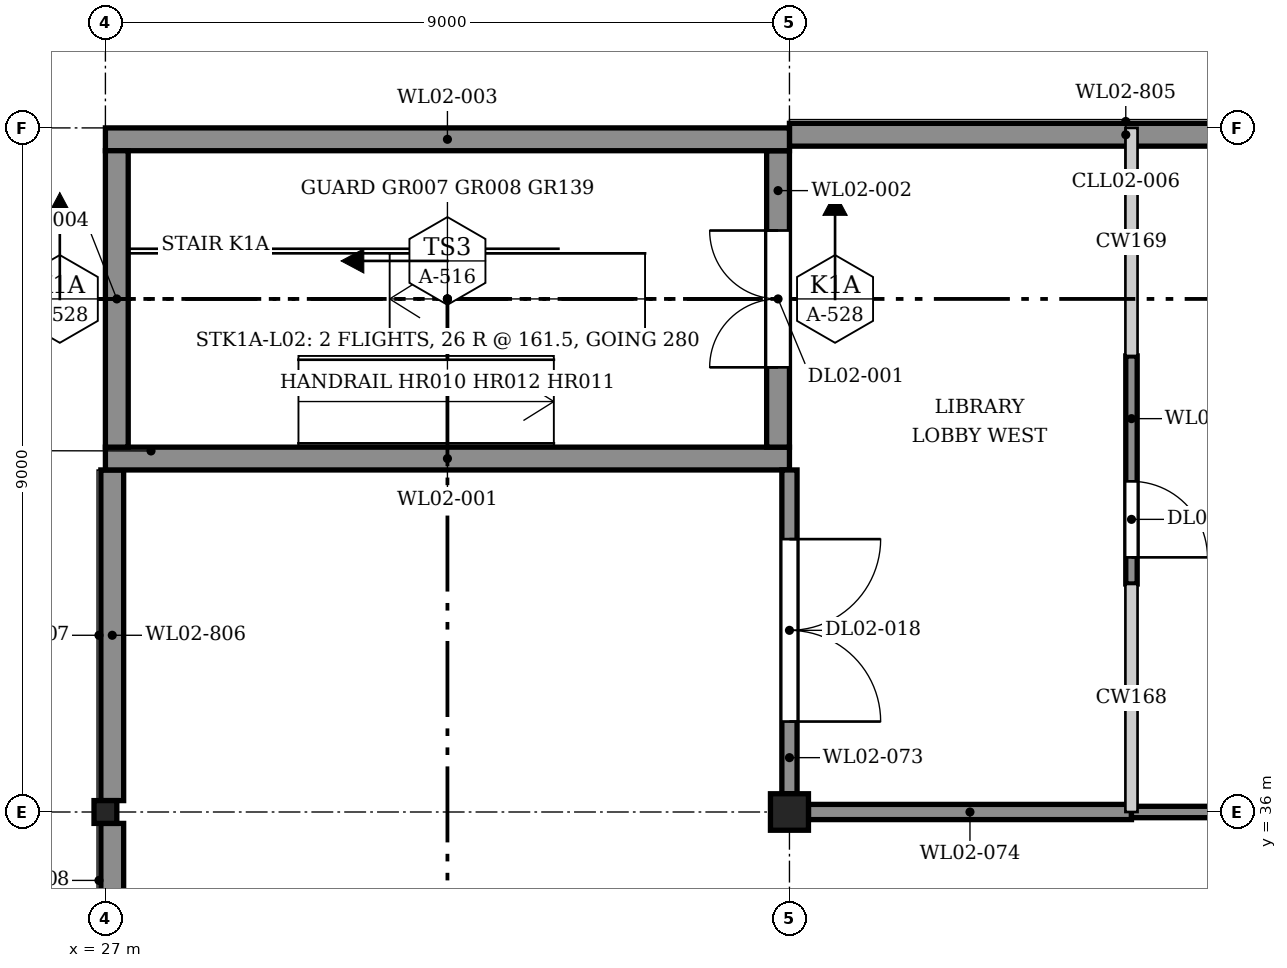
"""IFC4 building model, lengths in metres.
Left out: names, types, materials, properties, quantities, classifications, styles, units other than length and angle.
Written with IfcOpenShell. Run it as: python <this file> out.ifc"""

import sys

from ifc_helpers import new_model, si_unit, direction, frame, frame_2d, origin, origin_2d, place, context, subcontext, project, spatial, rectangle, hollow_rectangle, i_section, extrude, element, fill, save


model = new_model("IFC4")
c1 = context("Model", 3, precision=1e-05, world=origin(), true_north=direction((0.0, 1.0)))
c2 = subcontext(c1, "Body", "Model", "MODEL_VIEW")
j1 = project(units=[si_unit("LENGTHUNIT", "METRE"), si_unit("PLANEANGLEUNIT", "RADIAN")], contexts=[c1])
p1 = place(None, origin())
s1 = spatial("IfcSite", under=j1, at=p1, CompositionType="ELEMENT")
p2 = place(p1, origin())
s2 = spatial("IfcBuilding", under=s1, at=p2, CompositionType="ELEMENT")
p3 = place(p2, frame((0.0, 0.0, 9.2)))
s3 = spatial("IfcBuildingStorey", under=s2, at=p3, CompositionType="ELEMENT", Elevation=9.2)
p4 = place(p3, frame((27.0, 36.0, 0.0), z_axis=(0.0, 0.0, 1.0), x_axis=(1.0, 0.0, 0.0)))
e1 = element("IfcColumn", 1, at=p4, inside=s3, PredefinedType="COLUMN", context=c2, shape_type="SweptSolid", body=[
    extrude(hollow_rectangle(XDim=0.3, YDim=0.3, WallThickness=0.01, InnerFilletRadius=0.015, OuterFilletRadius=0.025, at=origin_2d()), origin(), (0.0, 0.0, 1.0), 4.2),
])
p5 = place(p3, frame((36.0, 36.0, 0.0), z_axis=(0.0, 0.0, 1.0), x_axis=(1.0, 0.0, 0.0)))
e2 = element("IfcColumn", 2, at=p5, inside=s3, PredefinedType="COLUMN", context=c2, shape_type="SweptSolid", body=[
    extrude(i_section(OverallWidth=0.5, OverallDepth=0.48, WebThickness=0.04, FlangeThickness=0.04, at=origin_2d()), origin(), (0.0, 0.0, 1.0), 3.335),
])
p6 = place(p3, frame((36.0, 44.91, 0.0), z_axis=(0.0, 0.0, 1.0), x_axis=(1.0, 0.0, 0.0)))
e3 = element("IfcWall", 3, at=p6, inside=s3, PredefinedType="SOLIDWALL", context=c2, shape_type="SweptSolid", body=[
    extrude(rectangle(XDim=8.85, YDim=0.3, at=frame_2d((4.425, 0.0))), origin(), (0.0, 0.0, 1.0), 3.578),
])
p7 = place(p3, frame((27.09, 36.15, 0.0), z_axis=(0.0, 0.0, 1.0), x_axis=(0.0, 1.0, 0.0)))
e4 = element("IfcWall", 4, at=p7, inside=s3, PredefinedType="SOLIDWALL", context=c2, shape_type="SweptSolid", body=[
    extrude(rectangle(XDim=4.35, YDim=0.3, at=frame_2d((2.175, 0.0))), origin(), (0.0, 0.0, 1.0), 3.578),
])
p8 = place(p3, frame((27.09, 27.15, 0.0), z_axis=(0.0, 0.0, 1.0), x_axis=(0.0, 1.0, 0.0)))
e5 = element("IfcWall", 5, at=p8, inside=s3, PredefinedType="SOLIDWALL", context=c2, shape_type="SweptSolid", body=[
    extrude(rectangle(XDim=8.7, YDim=0.3, at=frame_2d((4.35, 0.0))), origin(), (0.0, 0.0, 1.0), 3.578),
])
p9 = place(p8, frame((1.5, 0.0, 0.9)))
e6 = element("IfcOpeningElement", 6, at=p9, cuts=e5, PredefinedType="OPENING", context=c2, shape_type="SweptSolid", body=[
    extrude(rectangle(XDim=1.2, YDim=2.3, at=frame_2d((0.6, 1.15))), frame((0.0, 0.16, 0.0), z_axis=(0.0, -1.0, 0.0), x_axis=(1.0, 0.0, 0.0)), (0.0, 0.0, 1.0), 0.32),
])
p10 = place(p8, frame((6.0, 0.0, 0.9)))
e7 = element("IfcOpeningElement", 7, at=p10, cuts=e5, PredefinedType="OPENING", context=c2, shape_type="SweptSolid", body=[
    extrude(rectangle(XDim=1.2, YDim=2.3, at=frame_2d((0.6, 1.15))), frame((0.0, 0.16, 0.0), z_axis=(0.0, -1.0, 0.0), x_axis=(1.0, 0.0, 0.0)), (0.0, 0.0, 1.0), 0.32),
])
p11 = place(p3, frame((27.0, 40.65, 0.0), z_axis=(0.0, 0.0, 1.0), x_axis=(1.0, 0.0, 0.0)))
e8 = element("IfcWall", 8, at=p11, inside=s3, PredefinedType="SOLIDWALL", context=c2, shape_type="SweptSolid", body=[
    extrude(rectangle(XDim=9.0, YDim=0.3, at=frame_2d((4.5, 0.0))), origin(), (0.0, 0.0, 1.0), 4.2),
])
p12 = place(p3, frame((35.85, 40.8, 0.0), z_axis=(0.0, 0.0, 1.0), x_axis=(0.0, 1.0, 0.0)))
e9 = element("IfcWall", 9, at=p12, inside=s3, PredefinedType="SOLIDWALL", context=c2, shape_type="SweptSolid", body=[
    extrude(rectangle(XDim=3.9, YDim=0.3, at=frame_2d((1.95, 0.0))), origin(), (0.0, 0.0, 1.0), 4.2),
])
p13 = place(p12, frame((1.05, 0.0, 0.0)))
e10 = element("IfcOpeningElement", 10, at=p13, cuts=e9, PredefinedType="OPENING", context=c2, shape_type="SweptSolid", body=[
    extrude(rectangle(XDim=1.8, YDim=2.1, at=frame_2d((0.9, 1.05))), frame((0.0, 0.16, 0.0), z_axis=(0.0, -1.0, 0.0), x_axis=(1.0, 0.0, 0.0)), (0.0, 0.0, 1.0), 0.32),
])
p14 = place(p3, frame((27.0, 44.85, 0.0), z_axis=(0.0, 0.0, 1.0), x_axis=(1.0, 0.0, 0.0)))
e11 = element("IfcWall", 11, at=p14, inside=s3, PredefinedType="SOLIDWALL", context=c2, shape_type="SweptSolid", body=[
    extrude(rectangle(XDim=9.0, YDim=0.3, at=frame_2d((4.5, 0.0))), origin(), (0.0, 0.0, 1.0), 4.2),
])
p15 = place(p3, frame((27.15, 40.8, 0.0), z_axis=(0.0, 0.0, 1.0), x_axis=(0.0, 1.0, 0.0)))
e12 = element("IfcWall", 12, at=p15, inside=s3, PredefinedType="SOLIDWALL", context=c2, shape_type="SweptSolid", body=[
    extrude(rectangle(XDim=3.9, YDim=0.3, at=frame_2d((1.95, 0.0))), origin(), (0.0, 0.0, 1.0), 4.2),
])
p16 = place(p3, frame((36.0, 36.24, 0.0), z_axis=(0.0, 0.0, 1.0), x_axis=(0.0, 1.0, 0.0)))
e13 = element("IfcWall", 13, at=p16, inside=s3, PredefinedType="PARTITIONING", context=c2, shape_type="SweptSolid", body=[
    extrude(rectangle(XDim=4.26, YDim=0.2, at=frame_2d((2.13, 0.0))), origin(), (0.0, 0.0, 1.0), 4.035),
])
p17 = place(p16, frame((0.95, 0.0, 0.0)))
e14 = element("IfcOpeningElement", 14, at=p17, cuts=e13, PredefinedType="OPENING", context=c2, shape_type="SweptSolid", body=[
    extrude(rectangle(XDim=2.4, YDim=2.4, at=frame_2d((1.2, 1.2))), frame((0.0, 0.11, 0.0), z_axis=(0.0, -1.0, 0.0), x_axis=(1.0, 0.0, 0.0)), (0.0, 0.0, 1.0), 0.22),
])
p18 = place(p3, frame((36.25, 36.0, 0.0), z_axis=(0.0, 0.0, 1.0), x_axis=(1.0, 0.0, 0.0)))
e15 = element("IfcWall", 15, at=p18, inside=s3, PredefinedType="PARTITIONING", context=c2, shape_type="SweptSolid", body=[
    extrude(rectangle(XDim=4.25, YDim=0.2, at=frame_2d((2.125, 0.0))), origin(), (0.0, 0.0, 1.0), 3.502),
])
p19 = place(p3, frame((40.5, 36.0, 0.0), z_axis=(0.0, 0.0, 1.0), x_axis=(1.0, 0.0, 0.0)))
e16 = element("IfcWall", 16, at=p19, inside=s3, PredefinedType="PARTITIONING", context=c2, shape_type="SweptSolid", body=[
    extrude(rectangle(XDim=4.373, YDim=0.15, at=frame_2d((2.187, 0.0))), origin(), (0.0, 0.0, 1.0), 3.502),
])
p20 = place(p3, frame((40.5, 39.0, 0.0), z_axis=(0.0, 0.0, 1.0), x_axis=(0.0, 1.0, 0.0)))
e17 = element("IfcWall", 17, at=p20, inside=s3, PredefinedType="PARTITIONING", context=c2, shape_type="SweptSolid", body=[
    extrude(rectangle(XDim=3.0, YDim=0.15, at=frame_2d((1.5, 0.0))), origin(), (0.0, 0.0, 1.0), 3.502),
])
p21 = place(p20, frame((0.35, 0.0, 0.0)))
e18 = element("IfcOpeningElement", 18, at=p21, cuts=e17, PredefinedType="OPENING", context=c2, shape_type="SweptSolid", body=[
    extrude(rectangle(XDim=1.0, YDim=2.1, at=frame_2d((0.5, 1.05))), frame((0.0, 0.085, 0.0), z_axis=(0.0, -1.0, 0.0), x_axis=(1.0, 0.0, 0.0)), (0.0, 0.0, 1.0), 0.17),
])
p22 = place(p13, origin())
e19 = element("IfcDoor", 19, at=p22, inside=s3, OperationType="DOUBLE_DOOR_SINGLE_SWING", PredefinedType="DOOR", context=c2, shape_type="SweptSolid", body=[
    extrude(rectangle(XDim=1.8, YDim=2.1, at=frame_2d((0.9, 1.05))), frame((0.0, 0.025, 0.0), z_axis=(0.0, -1.0, 0.0), x_axis=(1.0, 0.0, 0.0)), (0.0, 0.0, 1.0), 0.05),
])
fill(e10, e19)
p23 = place(p17, frame((2.4, 0.0, 0.0), z_axis=(0.0, 0.0, 1.0), x_axis=(-1.0, 0.0, 0.0)))
e20 = element("IfcDoor", 20, at=p23, inside=s3, OperationType="DOUBLE_DOOR_SINGLE_SWING", PredefinedType="DOOR", context=c2, shape_type="SweptSolid", body=[
    extrude(rectangle(XDim=2.4, YDim=2.4, at=frame_2d((1.2, 1.2))), frame((0.0, 0.025, 0.0), z_axis=(0.0, -1.0, 0.0), x_axis=(1.0, 0.0, 0.0)), (0.0, 0.0, 1.0), 0.05),
])
fill(e14, e20)
p24 = place(p21, frame((1.0, 0.0, 0.0), z_axis=(0.0, 0.0, 1.0), x_axis=(-1.0, 0.0, 0.0)))
e21 = element("IfcDoor", 21, at=p24, inside=s3, OperationType="SINGLE_SWING_LEFT", PredefinedType="DOOR", context=c2, shape_type="SweptSolid", body=[
    extrude(rectangle(XDim=1.0, YDim=2.1, at=frame_2d((0.5, 1.05))), frame((0.0, 0.025, 0.0), z_axis=(0.0, -1.0, 0.0), x_axis=(1.0, 0.0, 0.0)), (0.0, 0.0, 1.0), 0.05),
])
fill(e18, e21)
save(model, sys.argv[1])
